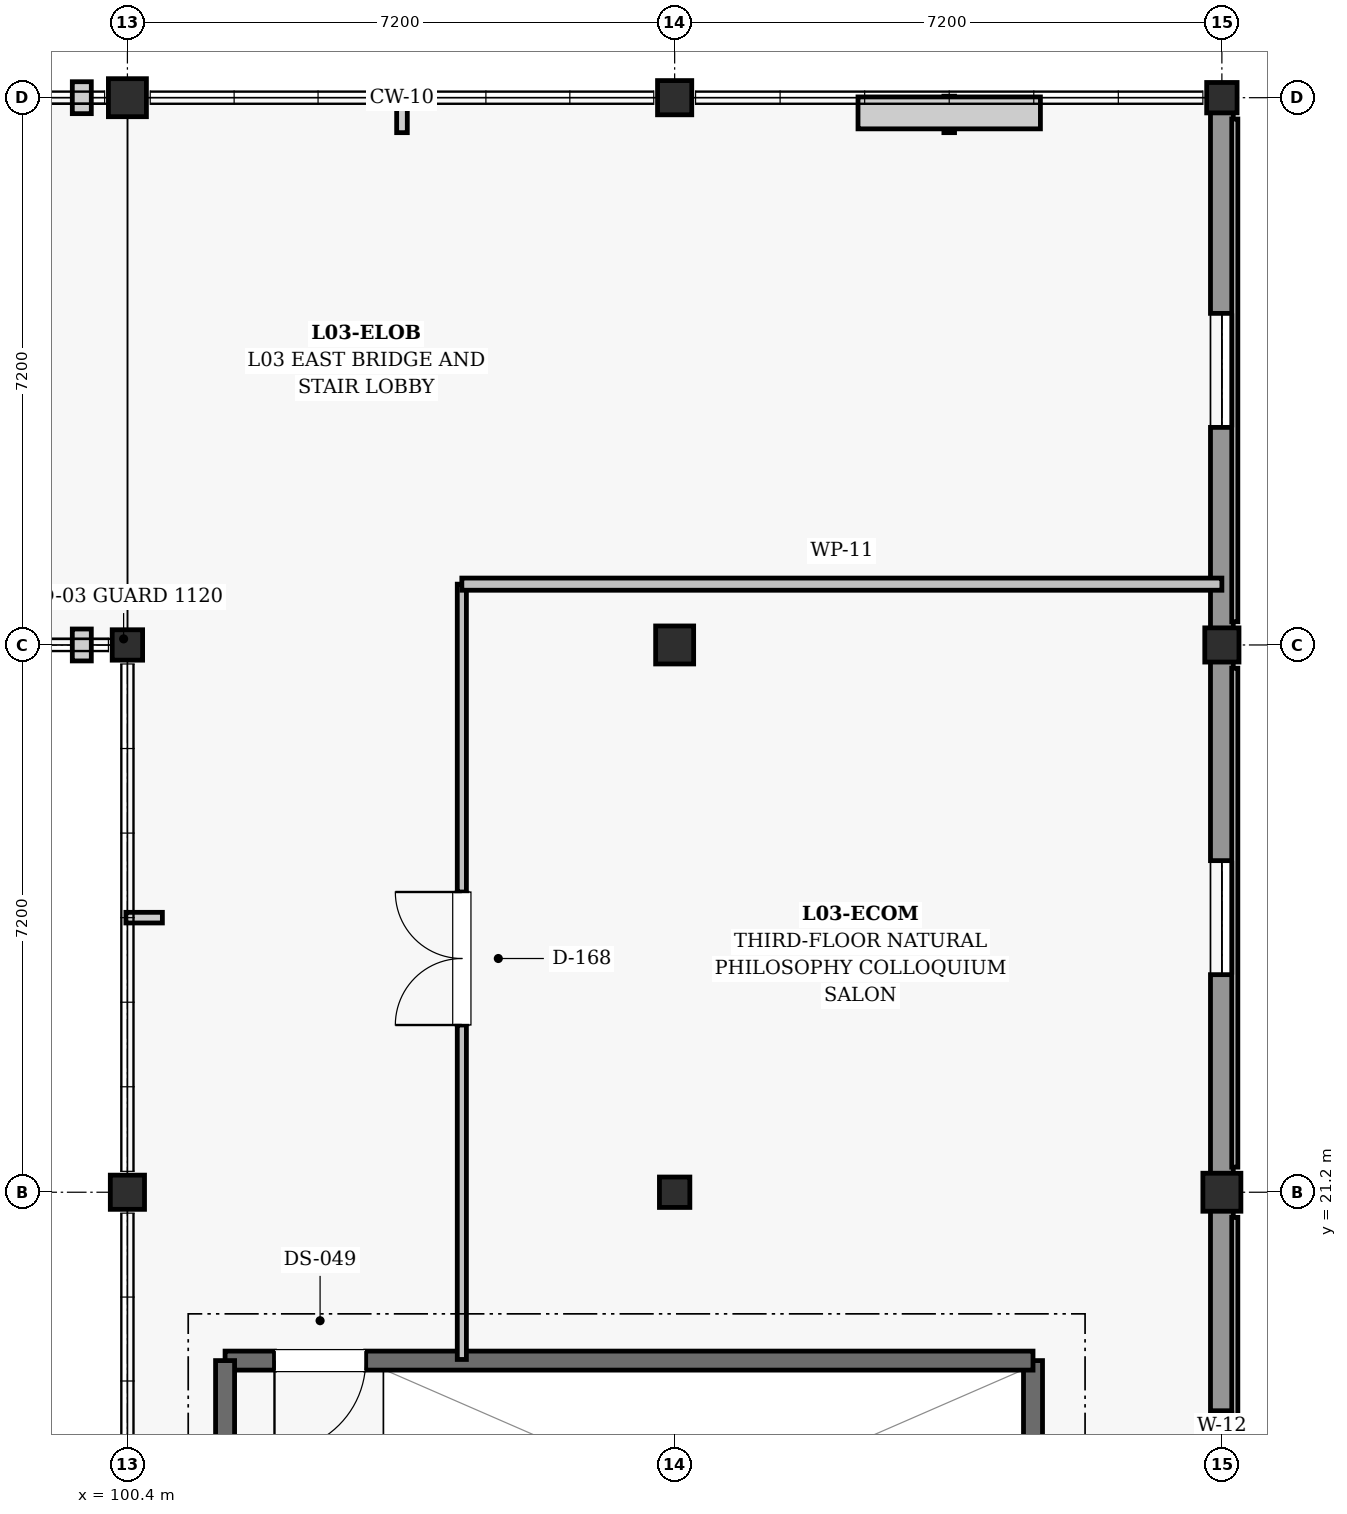
"""IFC4 building model, lengths in metres.
Left out: names, types, materials, properties, quantities, classifications, styles, units other than length and angle.
Written with IfcOpenShell. Run it as: python <this file> out.ifc"""

import sys

from ifc_helpers import new_model, si_unit, direction, frame, frame_2d, origin, origin_2d, place, context, subcontext, project, spatial, rectangle, extrude, element, fill, save


model = new_model("IFC4")
c1 = context("Model", 3, precision=1e-05, world=origin(), true_north=direction((0.0, 1.0)))
c2 = subcontext(c1, "Body", "Model", "MODEL_VIEW")
j1 = project(units=[si_unit("LENGTHUNIT", "METRE"), si_unit("PLANEANGLEUNIT", "RADIAN")], contexts=[c1])
p1 = place(None, origin())
s1 = spatial("IfcSite", under=j1, at=p1, CompositionType="ELEMENT")
p2 = place(p1, origin())
s2 = spatial("IfcBuilding", under=s1, at=p2, CompositionType="ELEMENT")
p3 = place(p2, frame((0.0, 0.0, 14.4)))
s3 = spatial("IfcBuildingStorey", under=s2, at=p3, CompositionType="ELEMENT", Elevation=14.4)
p4 = place(p3, frame((100.4, 21.2, 0.0), z_axis=(0.0, 0.0, 1.0), x_axis=(1.0, 0.0, 0.0)))
e1 = element("IfcColumn", 1, at=p4, inside=s3, PredefinedType="COLUMN", context=c2, shape_type="SweptSolid", body=[
    extrude(rectangle(XDim=0.45, YDim=0.45, at=origin_2d()), origin(), (0.0, 0.0, 1.0), 4.5),
])
p5 = place(p3, frame((100.4, 28.4, 0.0), z_axis=(0.0, 0.0, 1.0), x_axis=(1.0, 0.0, 0.0)))
e2 = element("IfcColumn", 2, at=p5, inside=s3, PredefinedType="COLUMN", context=c2, shape_type="SweptSolid", body=[
    extrude(rectangle(XDim=0.4, YDim=0.4, at=origin_2d()), origin(), (0.0, 0.0, 1.0), 4.5),
])
p6 = place(p3, frame((100.4, 35.6, 0.0), z_axis=(0.0, 0.0, 1.0), x_axis=(1.0, 0.0, 0.0)))
e3 = element("IfcColumn", 3, at=p6, inside=s3, PredefinedType="COLUMN", context=c2, shape_type="SweptSolid", body=[
    extrude(rectangle(XDim=0.5, YDim=0.5, at=origin_2d()), origin(), (0.0, 0.0, 1.0), 4.5),
])
p7 = place(p3, frame((107.6, 21.2, 0.0), z_axis=(0.0, 0.0, 1.0), x_axis=(1.0, 0.0, 0.0)))
e4 = element("IfcColumn", 4, at=p7, inside=s3, PredefinedType="COLUMN", context=c2, shape_type="SweptSolid", body=[
    extrude(rectangle(XDim=0.4, YDim=0.4, at=origin_2d()), origin(), (0.0, 0.0, 1.0), 4.5),
])
p8 = place(p3, frame((107.6, 28.4, 0.0), z_axis=(0.0, 0.0, 1.0), x_axis=(1.0, 0.0, 0.0)))
e5 = element("IfcColumn", 5, at=p8, inside=s3, PredefinedType="COLUMN", context=c2, shape_type="SweptSolid", body=[
    extrude(rectangle(XDim=0.5, YDim=0.5, at=origin_2d()), origin(), (0.0, 0.0, 1.0), 4.5),
])
p9 = place(p3, frame((107.6, 35.6, 0.0), z_axis=(0.0, 0.0, 1.0), x_axis=(1.0, 0.0, 0.0)))
e6 = element("IfcColumn", 6, at=p9, inside=s3, PredefinedType="COLUMN", context=c2, shape_type="SweptSolid", body=[
    extrude(rectangle(XDim=0.45, YDim=0.45, at=origin_2d()), origin(), (0.0, 0.0, 1.0), 4.5),
])
p10 = place(p3, frame((114.8, 21.2, 0.0), z_axis=(0.0, 0.0, 1.0), x_axis=(1.0, 0.0, 0.0)))
e7 = element("IfcColumn", 7, at=p10, inside=s3, PredefinedType="COLUMN", context=c2, shape_type="SweptSolid", body=[
    extrude(rectangle(XDim=0.5, YDim=0.5, at=origin_2d()), origin(), (0.0, 0.0, 1.0), 4.5),
])
p11 = place(p3, frame((114.8, 28.4, 0.0), z_axis=(0.0, 0.0, 1.0), x_axis=(1.0, 0.0, 0.0)))
e8 = element("IfcColumn", 8, at=p11, inside=s3, PredefinedType="COLUMN", context=c2, shape_type="SweptSolid", body=[
    extrude(rectangle(XDim=0.45, YDim=0.45, at=origin_2d()), origin(), (0.0, 0.0, 1.0), 4.5),
])
p12 = place(p3, frame((114.8, 35.6, 0.0), z_axis=(0.0, 0.0, 1.0), x_axis=(1.0, 0.0, 0.0)))
e9 = element("IfcColumn", 9, at=p12, inside=s3, PredefinedType="COLUMN", context=c2, shape_type="SweptSolid", body=[
    extrude(rectangle(XDim=0.4, YDim=0.4, at=origin_2d()), origin(), (0.0, 0.0, 1.0), 4.5),
])
p13 = place(p3, frame((114.8, 14.18, 0.0), z_axis=(0.0, 0.0, 1.0), x_axis=(0.0, 1.0, 0.0)))
e10 = element("IfcWall", 10, at=p13, inside=s3, PredefinedType="SOLIDWALL", context=c2, shape_type="SweptSolid", body=[
    extrude(rectangle(XDim=6.79, YDim=0.3, at=frame_2d((3.395, 0.0))), origin(), (0.0, 0.0, 1.0), 3.355),
])
p14 = place(p13, frame((2.645, 0.0, 1.85)))
e11 = element("IfcOpeningElement", 11, at=p14, cuts=e10, PredefinedType="OPENING", context=c2, shape_type="SweptSolid", body=[
    extrude(rectangle(XDim=1.5, YDim=1.1, at=frame_2d((0.75, 0.55))), frame((0.0, 0.16, 0.0), z_axis=(0.0, -1.0, 0.0), x_axis=(1.0, 0.0, 0.0)), (0.0, 0.0, 1.0), 0.32),
])
p15 = place(p3, frame((114.8, 21.43, 0.0), z_axis=(0.0, 0.0, 1.0), x_axis=(0.0, 1.0, 0.0)))
e12 = element("IfcWall", 12, at=p15, inside=s3, PredefinedType="SOLIDWALL", context=c2, shape_type="SweptSolid", body=[
    extrude(rectangle(XDim=6.765, YDim=0.3, at=frame_2d((3.383, 0.0))), origin(), (0.0, 0.0, 1.0), 3.355),
])
p16 = place(p15, frame((2.633, 0.0, 1.85)))
e13 = element("IfcOpeningElement", 13, at=p16, cuts=e12, PredefinedType="OPENING", context=c2, shape_type="SweptSolid", body=[
    extrude(rectangle(XDim=1.5, YDim=1.1, at=frame_2d((0.75, 0.55))), frame((0.0, 0.16, 0.0), z_axis=(0.0, -1.0, 0.0), x_axis=(1.0, 0.0, 0.0)), (0.0, 0.0, 1.0), 0.32),
])
p17 = place(p3, frame((114.8, 28.605, 0.0), z_axis=(0.0, 0.0, 1.0), x_axis=(0.0, 1.0, 0.0)))
e14 = element("IfcWall", 14, at=p17, inside=s3, PredefinedType="SOLIDWALL", context=c2, shape_type="SweptSolid", body=[
    extrude(rectangle(XDim=6.815, YDim=0.3, at=frame_2d((3.407, 0.0))), origin(), (0.0, 0.0, 1.0), 3.455),
])
p18 = place(p17, frame((2.657, 0.0, 1.85)))
e15 = element("IfcOpeningElement", 15, at=p18, cuts=e14, PredefinedType="OPENING", context=c2, shape_type="SweptSolid", body=[
    extrude(rectangle(XDim=1.5, YDim=1.1, at=frame_2d((0.75, 0.55))), frame((0.0, 0.16, 0.0), z_axis=(0.0, -1.0, 0.0), x_axis=(1.0, 0.0, 0.0)), (0.0, 0.0, 1.0), 0.32),
])
p19 = place(p3, frame((112.315, 15.085, 0.0), z_axis=(0.0, 0.0, 1.0), x_axis=(0.0, 1.0, 0.0)))
e16 = element("IfcWall", 16, at=p19, inside=s3, PredefinedType="SHEAR", context=c2, shape_type="SweptSolid", body=[
    extrude(rectangle(XDim=3.9, YDim=0.25, at=frame_2d((1.95, 0.0))), origin(), (0.0, 0.0, 1.0), 4.245),
])
p20 = place(p3, frame((112.315, 18.985, 0.0), z_axis=(0.0, 0.0, 1.0), x_axis=(-1.0, 0.0, 0.0)))
e17 = element("IfcWall", 17, at=p20, inside=s3, PredefinedType="SHEAR", context=c2, shape_type="SweptSolid", body=[
    extrude(rectangle(XDim=10.63, YDim=0.25, at=frame_2d((5.315, 0.0))), origin(), (0.0, 0.0, 1.0), 4.245),
])
p21 = place(p20, frame((8.78, 0.0, 0.0)))
e18 = element("IfcOpeningElement", 18, at=p21, cuts=e17, PredefinedType="OPENING", context=c2, shape_type="SweptSolid", body=[
    extrude(rectangle(XDim=1.2, YDim=2.15, at=frame_2d((0.6, 1.075))), frame((0.0, 0.135, 0.0), z_axis=(0.0, -1.0, 0.0), x_axis=(1.0, 0.0, 0.0)), (0.0, 0.0, 1.0), 0.27),
])
p22 = place(p3, frame((101.685, 18.985, 0.0), z_axis=(0.0, 0.0, 1.0), x_axis=(0.0, -1.0, 0.0)))
e19 = element("IfcWall", 19, at=p22, inside=s3, PredefinedType="SHEAR", context=c2, shape_type="SweptSolid", body=[
    extrude(rectangle(XDim=3.9, YDim=0.25, at=frame_2d((1.95, 0.0))), origin(), (0.0, 0.0, 1.0), 4.245),
])
p23 = place(p3, frame((104.8, 19.0, 0.0), z_axis=(0.0, 0.0, 1.0), x_axis=(0.0, 1.0, 0.0)))
e20 = element("IfcWall", 20, at=p23, inside=s3, PredefinedType="PARTITIONING", context=c2, shape_type="SweptSolid", body=[
    extrude(rectangle(XDim=10.2, YDim=0.12, at=frame_2d((5.1, 0.0))), origin(), (0.0, 0.0, 1.0), 3.41),
])
p24 = place(p23, frame((4.4, 0.0, 0.0)))
e21 = element("IfcOpeningElement", 21, at=p24, cuts=e20, PredefinedType="OPENING", context=c2, shape_type="SweptSolid", body=[
    extrude(rectangle(XDim=1.75, YDim=2.25, at=frame_2d((0.875, 1.125))), frame((0.0, 0.07, 0.0), z_axis=(0.0, -1.0, 0.0), x_axis=(1.0, 0.0, 0.0)), (0.0, 0.0, 1.0), 0.14),
])
p25 = place(p3, frame((104.8, 29.2, 0.0), z_axis=(0.0, 0.0, 1.0), x_axis=(1.0, 0.0, 0.0)))
e22 = element("IfcWall", 22, at=p25, inside=s3, PredefinedType="PARTITIONING", context=c2, shape_type="SweptSolid", body=[
    extrude(rectangle(XDim=10.0, YDim=0.16, at=frame_2d((5.0, 0.0))), origin(), (0.0, 0.0, 1.0), 3.46),
])
p26 = place(p14, origin())
e23 = element("IfcWindow", 23, at=p26, inside=s3, PartitioningType="SINGLE_PANEL", PredefinedType="WINDOW", context=c2, shape_type="SweptSolid", body=[
    extrude(rectangle(XDim=1.5, YDim=1.1, at=frame_2d((0.75, 0.55))), frame((0.0, 0.03, 0.0), z_axis=(0.0, -1.0, 0.0), x_axis=(1.0, 0.0, 0.0)), (0.0, 0.0, 1.0), 0.06),
])
fill(e11, e23)
p27 = place(p16, origin())
e24 = element("IfcWindow", 24, at=p27, inside=s3, PartitioningType="SINGLE_PANEL", PredefinedType="WINDOW", context=c2, shape_type="SweptSolid", body=[
    extrude(rectangle(XDim=1.5, YDim=1.1, at=frame_2d((0.75, 0.55))), frame((0.0, 0.03, 0.0), z_axis=(0.0, -1.0, 0.0), x_axis=(1.0, 0.0, 0.0)), (0.0, 0.0, 1.0), 0.06),
])
fill(e13, e24)
p28 = place(p18, origin())
e25 = element("IfcWindow", 25, at=p28, inside=s3, PartitioningType="SINGLE_PANEL", PredefinedType="WINDOW", context=c2, shape_type="SweptSolid", body=[
    extrude(rectangle(XDim=1.5, YDim=1.1, at=frame_2d((0.75, 0.55))), frame((0.0, 0.03, 0.0), z_axis=(0.0, -1.0, 0.0), x_axis=(1.0, 0.0, 0.0)), (0.0, 0.0, 1.0), 0.06),
])
fill(e15, e25)
p29 = place(p21, origin())
e26 = element("IfcDoor", 26, at=p29, inside=s3, OperationType="SINGLE_SWING_RIGHT", PredefinedType="DOOR", context=c2, shape_type="SweptSolid", body=[
    extrude(rectangle(XDim=1.2, YDim=2.15, at=frame_2d((0.6, 1.075))), frame((0.0, 0.025, 0.0), z_axis=(0.0, -1.0, 0.0), x_axis=(1.0, 0.0, 0.0)), (0.0, 0.0, 1.0), 0.05),
])
fill(e18, e26)
p30 = place(p24, origin())
e27 = element("IfcDoor", 27, at=p30, inside=s3, OperationType="DOUBLE_DOOR_SINGLE_SWING", PredefinedType="DOOR", context=c2, shape_type="SweptSolid", body=[
    extrude(rectangle(XDim=1.75, YDim=2.25, at=frame_2d((0.875, 1.125))), frame((0.0, 0.025, 0.0), z_axis=(0.0, -1.0, 0.0), x_axis=(1.0, 0.0, 0.0)), (0.0, 0.0, 1.0), 0.05),
])
fill(e21, e27)
save(model, sys.argv[1])
